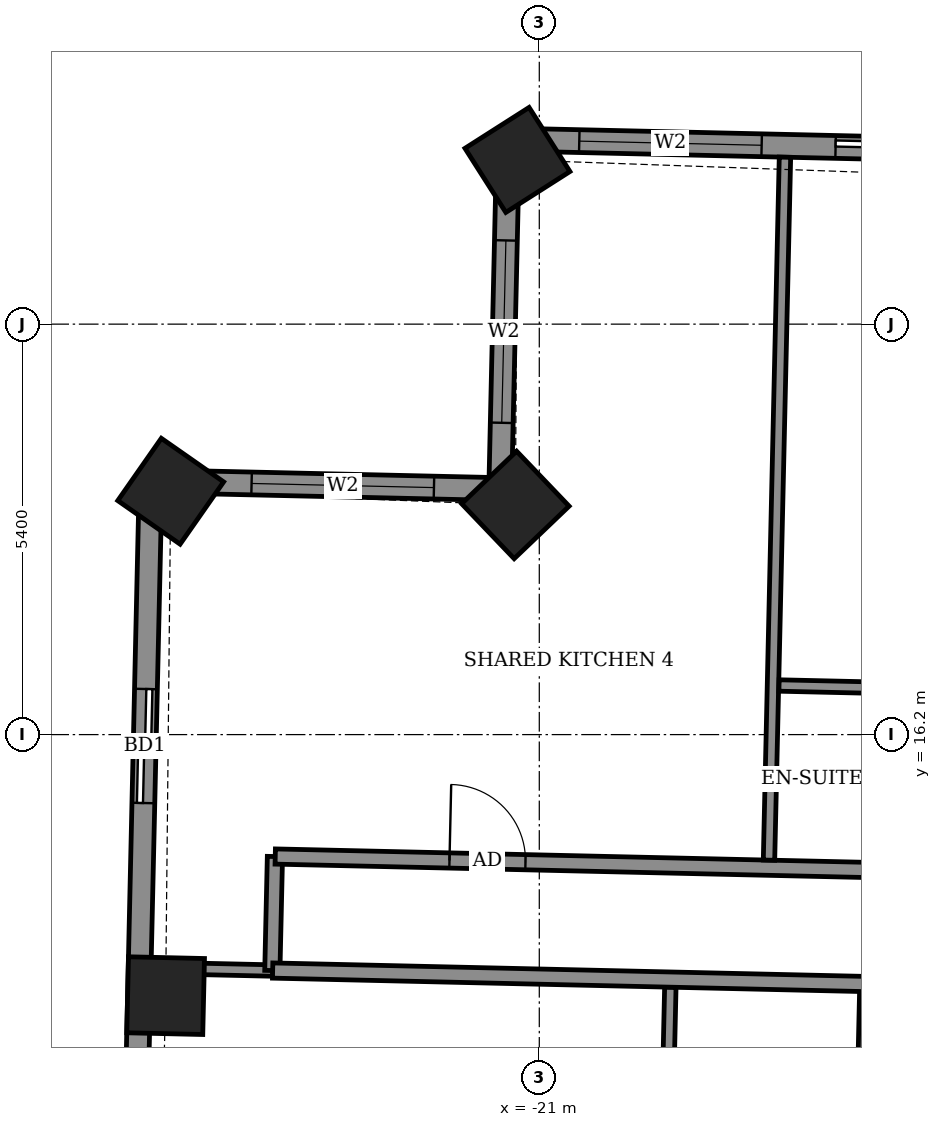
"""IFC4 building model, lengths in metres.
Left out: names, types, materials, properties, quantities, classifications, styles, units other than length and angle.
Written with IfcOpenShell. Run it as: python <this file> out.ifc"""

import sys

from ifc_helpers import new_model, si_unit, direction, frame, frame_2d, origin, origin_2d, place, context, subcontext, project, spatial, rectangle, extrude, element, fill, save


model = new_model("IFC4")
c1 = context("Model", 3, precision=1e-05, world=origin(), true_north=direction((0.0, 1.0)))
c2 = subcontext(c1, "Body", "Model", "MODEL_VIEW")
j1 = project(units=[si_unit("LENGTHUNIT", "METRE"), si_unit("PLANEANGLEUNIT", "RADIAN")], contexts=[c1])
p1 = place(None, origin())
s1 = spatial("IfcSite", under=j1, at=p1, CompositionType="ELEMENT")
p2 = place(p1, origin())
s2 = spatial("IfcBuilding", under=s1, at=p2, CompositionType="ELEMENT")
p3 = place(p2, frame((0.0, 0.0, 268.1)))
s3 = spatial("IfcBuildingStorey", under=s2, at=p3, CompositionType="ELEMENT", Elevation=268.1)
for number, where, z_axis, x_axis in (
    (1, (-21.287, 23.76, -0.55), (0.0, 0.0, 1.0), (-0.843, -0.538, 0.0)),
    (2, (-21.314, 19.221, -0.55), (0.0, 0.0, 1.0), (-0.723, -0.691, 0.0)),
    (3, (-25.849, 19.402, -0.55), (0.0, 0.0, 1.0), (-0.573, -0.82, 0.0)),
    (4, (-25.916, 12.766, -0.55), (0.0, 0.0, 1.0), (-0.023, -1.0, 0.0)),
):
    element("IfcColumn", number, at=place(p3, frame(where, z_axis=z_axis, x_axis=x_axis)), inside=s3, PredefinedType="COLUMN", context=c2, shape_type="SweptSolid", body=[
        extrude(rectangle(XDim=1.0, YDim=1.0, at=origin_2d()), origin(), (0.0, 0.0, 1.0), 3.6),
    ])
p4 = place(p3, frame((26.35, 22.945, 0.0), z_axis=(0.0, 0.0, 1.0), x_axis=(-0.999742523712, 0.022691105788, 0.0)))
e5 = element("IfcWall", 5, at=p4, inside=s3, PredefinedType="SOLIDWALL", context=c2, shape_type="SweptSolid", body=[
    extrude(rectangle(XDim=47.771, YDim=0.3, at=frame_2d((23.886, 0.0))), origin(), (0.0, 0.0, 1.0), 2.55),
])
p5 = place(p4, frame((1.954, 0.0, 0.0)))
e6 = element("IfcOpeningElement", 6, at=p5, cuts=e5, PredefinedType="OPENING", context=c2, shape_type="SweptSolid", body=[
    extrude(rectangle(XDim=1.5, YDim=2.4, at=frame_2d((0.75, 1.2))), frame((0.0, 0.16, 0.0), z_axis=(0.0, -1.0, 0.0), x_axis=(1.0, 0.0, 0.0)), (0.0, 0.0, 1.0), 0.32),
])
p6 = place(p4, frame((7.37, 0.0, 0.0)))
e7 = element("IfcOpeningElement", 7, at=p6, cuts=e5, PredefinedType="OPENING", context=c2, shape_type="SweptSolid", body=[
    extrude(rectangle(XDim=1.5, YDim=2.4, at=frame_2d((0.75, 1.2))), frame((0.0, 0.16, 0.0), z_axis=(0.0, -1.0, 0.0), x_axis=(1.0, 0.0, 0.0)), (0.0, 0.0, 1.0), 0.32),
])
p7 = place(p4, frame((10.554, 0.0, 0.0)))
e8 = element("IfcOpeningElement", 8, at=p7, cuts=e5, PredefinedType="OPENING", context=c2, shape_type="SweptSolid", body=[
    extrude(rectangle(XDim=1.5, YDim=2.4, at=frame_2d((0.75, 1.2))), frame((0.0, 0.16, 0.0), z_axis=(0.0, -1.0, 0.0), x_axis=(1.0, 0.0, 0.0)), (0.0, 0.0, 1.0), 0.32),
])
p8 = place(p4, frame((15.104, 0.0, 0.0)))
e9 = element("IfcOpeningElement", 9, at=p8, cuts=e5, PredefinedType="OPENING", context=c2, shape_type="SweptSolid", body=[
    extrude(rectangle(XDim=1.5, YDim=2.4, at=frame_2d((0.75, 1.2))), frame((0.0, 0.16, 0.0), z_axis=(0.0, -1.0, 0.0), x_axis=(1.0, 0.0, 0.0)), (0.0, 0.0, 1.0), 0.32),
])
p9 = place(p4, frame((18.287, 0.0, 0.0)))
e10 = element("IfcOpeningElement", 10, at=p9, cuts=e5, PredefinedType="OPENING", context=c2, shape_type="SweptSolid", body=[
    extrude(rectangle(XDim=1.5, YDim=2.4, at=frame_2d((0.75, 1.2))), frame((0.0, 0.16, 0.0), z_axis=(0.0, -1.0, 0.0), x_axis=(1.0, 0.0, 0.0)), (0.0, 0.0, 1.0), 0.32),
])
p10 = place(p4, frame((23.622, 0.0, 0.0)))
e11 = element("IfcOpeningElement", 11, at=p10, cuts=e5, PredefinedType="OPENING", context=c2, shape_type="SweptSolid", body=[
    extrude(rectangle(XDim=1.5, YDim=2.4, at=frame_2d((0.75, 1.2))), frame((0.0, 0.16, 0.0), z_axis=(0.0, -1.0, 0.0), x_axis=(1.0, 0.0, 0.0)), (0.0, 0.0, 1.0), 0.32),
])
p11 = place(p4, frame((28.521, 0.0, 0.0)))
e12 = element("IfcOpeningElement", 12, at=p11, cuts=e5, PredefinedType="OPENING", context=c2, shape_type="SweptSolid", body=[
    extrude(rectangle(XDim=1.5, YDim=2.4, at=frame_2d((0.75, 1.2))), frame((0.0, 0.16, 0.0), z_axis=(0.0, -1.0, 0.0), x_axis=(1.0, 0.0, 0.0)), (0.0, 0.0, 1.0), 0.32),
])
p12 = place(p4, frame((31.705, 0.0, 0.0)))
e13 = element("IfcOpeningElement", 13, at=p12, cuts=e5, PredefinedType="OPENING", context=c2, shape_type="SweptSolid", body=[
    extrude(rectangle(XDim=1.5, YDim=2.4, at=frame_2d((0.75, 1.2))), frame((0.0, 0.16, 0.0), z_axis=(0.0, -1.0, 0.0), x_axis=(1.0, 0.0, 0.0)), (0.0, 0.0, 1.0), 0.32),
])
p13 = place(p4, frame((36.722, 0.0, 0.0)))
e14 = element("IfcOpeningElement", 14, at=p13, cuts=e5, PredefinedType="OPENING", context=c2, shape_type="SweptSolid", body=[
    extrude(rectangle(XDim=1.5, YDim=2.4, at=frame_2d((0.75, 1.2))), frame((0.0, 0.16, 0.0), z_axis=(0.0, -1.0, 0.0), x_axis=(1.0, 0.0, 0.0)), (0.0, 0.0, 1.0), 0.32),
])
p14 = place(p4, frame((41.963, 0.0, 0.0)))
e15 = element("IfcOpeningElement", 15, at=p14, cuts=e5, PredefinedType="OPENING", context=c2, shape_type="SweptSolid", body=[
    extrude(rectangle(XDim=1.5, YDim=2.4, at=frame_2d((0.75, 1.2))), frame((0.0, 0.16, 0.0), z_axis=(0.0, -1.0, 0.0), x_axis=(1.0, 0.0, 0.0)), (0.0, 0.0, 1.0), 0.32),
])
p15 = place(p4, frame((44.436, 0.0, 0.9)))
e16 = element("IfcOpeningElement", 16, at=p15, cuts=e5, PredefinedType="OPENING", context=c2, shape_type="SweptSolid", body=[
    extrude(rectangle(XDim=2.4, YDim=1.5, at=frame_2d((1.2, 0.75))), frame((0.0, 0.16, 0.0), z_axis=(0.0, -1.0, 0.0), x_axis=(1.0, 0.0, 0.0)), (0.0, 0.0, 1.0), 0.32),
])
p16 = place(p3, frame((-21.409, 24.029, 0.0), z_axis=(0.0, 0.0, 1.0), x_axis=(-0.022820258049, -0.999739584003, 0.0)))
e17 = element("IfcWall", 17, at=p16, inside=s3, PredefinedType="SOLIDWALL", context=c2, shape_type="SweptSolid", body=[
    extrude(rectangle(XDim=4.6, YDim=0.3, at=frame_2d((2.3, 0.0))), origin(), (0.0, 0.0, 1.0), 2.55),
])
p17 = place(p16, frame((1.328, 0.0, 0.9)))
e18 = element("IfcOpeningElement", 18, at=p17, cuts=e17, PredefinedType="OPENING", context=c2, shape_type="SweptSolid", body=[
    extrude(rectangle(XDim=2.4, YDim=1.5, at=frame_2d((1.2, 0.75))), frame((0.0, 0.16, 0.0), z_axis=(0.0, -1.0, 0.0), x_axis=(1.0, 0.0, 0.0)), (0.0, 0.0, 1.0), 0.32),
])
p18 = place(p3, frame((-21.514, 19.43, 0.0), z_axis=(0.0, 0.0, 1.0), x_axis=(-0.999744404568, 0.02260808559, 0.0)))
e19 = element("IfcWall", 19, at=p18, inside=s3, PredefinedType="SOLIDWALL", context=c2, shape_type="SweptSolid", body=[
    extrude(rectangle(XDim=4.6, YDim=0.3, at=frame_2d((2.3, 0.0))), origin(), (0.0, 0.0, 1.0), 2.55),
])
p19 = place(p18, frame((0.872, 0.0, 0.9)))
e20 = element("IfcOpeningElement", 20, at=p19, cuts=e19, PredefinedType="OPENING", context=c2, shape_type="SweptSolid", body=[
    extrude(rectangle(XDim=2.4, YDim=1.5, at=frame_2d((1.2, 0.75))), frame((0.0, 0.16, 0.0), z_axis=(0.0, -1.0, 0.0), x_axis=(1.0, 0.0, 0.0)), (0.0, 0.0, 1.0), 0.32),
])
p20 = place(p3, frame((-26.113, 19.534, 0.0), z_axis=(0.0, 0.0, 1.0), x_axis=(-0.022649415303, -0.999743469089, 0.0)))
e21 = element("IfcWall", 21, at=p20, inside=s3, PredefinedType="SOLIDWALL", context=c2, shape_type="SweptSolid", body=[
    extrude(rectangle(XDim=14.175, YDim=0.3, at=frame_2d((7.087, 0.0))), origin(), (0.0, 0.0, 1.0), 2.55),
])
p21 = place(p20, frame((2.735, 0.0, 0.0)))
e22 = element("IfcOpeningElement", 22, at=p21, cuts=e21, PredefinedType="OPENING", context=c2, shape_type="SweptSolid", body=[
    extrude(rectangle(XDim=1.5, YDim=2.4, at=frame_2d((0.75, 1.2))), frame((0.0, 0.16, 0.0), z_axis=(0.0, -1.0, 0.0), x_axis=(1.0, 0.0, 0.0)), (0.0, 0.0, 1.0), 0.32),
])
p22 = place(p20, frame((9.019, 0.0, 0.9)))
e23 = element("IfcOpeningElement", 23, at=p22, cuts=e21, PredefinedType="OPENING", context=c2, shape_type="SweptSolid", body=[
    extrude(rectangle(XDim=2.4, YDim=1.5, at=frame_2d((1.2, 0.75))), frame((0.0, 0.16, 0.0), z_axis=(0.0, -1.0, 0.0), x_axis=(1.0, 0.0, 0.0)), (0.0, 0.0, 1.0), 0.32),
])
p23 = place(p3, frame((-17.262, -12.525, 0.0), z_axis=(0.0, 0.0, 1.0), x_axis=(0.022706151961, 0.999742182097, 0.0)))
e24 = element("IfcWall", 24, at=p23, inside=s3, PredefinedType="PARTITIONING", context=c2, shape_type="SweptSolid", body=[
    extrude(rectangle(XDim=25.45, YDim=0.2, at=frame_2d((12.725, 0.0))), origin(), (0.0, 0.0, 1.0), 3.05),
])
p24 = place(p23, frame((19.913, 0.0, 0.0)))
e25 = element("IfcOpeningElement", 25, at=p24, cuts=e24, PredefinedType="OPENING", context=c2, shape_type="SweptSolid", body=[
    extrude(rectangle(XDim=1.0, YDim=2.1, at=frame_2d((0.5, 1.05))), frame((0.0, 0.11, 0.0), z_axis=(0.0, -1.0, 0.0), x_axis=(1.0, 0.0, 0.0)), (0.0, 0.0, 1.0), 0.22),
])
p25 = place(p23, frame((23.6, 0.0, 0.0)))
e26 = element("IfcOpeningElement", 26, at=p25, cuts=e24, PredefinedType="OPENING", context=c2, shape_type="SweptSolid", body=[
    extrude(rectangle(XDim=0.9, YDim=2.1, at=frame_2d((0.45, 1.05))), frame((0.0, 0.11, 0.0), z_axis=(0.0, -1.0, 0.0), x_axis=(1.0, 0.0, 0.0)), (0.0, 0.0, 1.0), 0.22),
])
p26 = place(p23, frame((14.325, 0.0, 0.0)))
e27 = element("IfcOpeningElement", 27, at=p26, cuts=e24, PredefinedType="OPENING", context=c2, shape_type="SweptSolid", body=[
    extrude(rectangle(XDim=1.0, YDim=2.1, at=frame_2d((0.5, 1.05))), frame((0.0, 0.11, 0.0), z_axis=(0.0, -1.0, 0.0), x_axis=(1.0, 0.0, 0.0)), (0.0, 0.0, 1.0), 0.22),
])
p27 = place(p23, frame((16.525, 0.0, 0.0)))
e28 = element("IfcOpeningElement", 28, at=p27, cuts=e24, PredefinedType="OPENING", context=c2, shape_type="SweptSolid", body=[
    extrude(rectangle(XDim=0.9, YDim=2.1, at=frame_2d((0.45, 1.05))), frame((0.0, 0.11, 0.0), z_axis=(0.0, -1.0, 0.0), x_axis=(1.0, 0.0, 0.0)), (0.0, 0.0, 1.0), 0.22),
])
p28 = place(p23, frame((9.85, 0.0, 0.0)))
e29 = element("IfcOpeningElement", 29, at=p28, cuts=e24, PredefinedType="OPENING", context=c2, shape_type="SweptSolid", body=[
    extrude(rectangle(XDim=1.0, YDim=2.1, at=frame_2d((0.5, 1.05))), frame((0.0, 0.11, 0.0), z_axis=(0.0, -1.0, 0.0), x_axis=(1.0, 0.0, 0.0)), (0.0, 0.0, 1.0), 0.22),
])
p29 = place(p23, frame((12.125, 0.0, 0.0)))
e30 = element("IfcOpeningElement", 30, at=p29, cuts=e24, PredefinedType="OPENING", context=c2, shape_type="SweptSolid", body=[
    extrude(rectangle(XDim=0.9, YDim=2.1, at=frame_2d((0.45, 1.05))), frame((0.0, 0.11, 0.0), z_axis=(0.0, -1.0, 0.0), x_axis=(1.0, 0.0, 0.0)), (0.0, 0.0, 1.0), 0.22),
])
p30 = place(p23, frame((7.725, 0.0, 0.0)))
e31 = element("IfcOpeningElement", 31, at=p30, cuts=e24, PredefinedType="OPENING", context=c2, shape_type="SweptSolid", body=[
    extrude(rectangle(XDim=1.0, YDim=2.1, at=frame_2d((0.5, 1.05))), frame((0.0, 0.11, 0.0), z_axis=(0.0, -1.0, 0.0), x_axis=(1.0, 0.0, 0.0)), (0.0, 0.0, 1.0), 0.22),
])
p31 = place(p23, frame((5.275, 0.0, 0.0)))
e32 = element("IfcOpeningElement", 32, at=p31, cuts=e24, PredefinedType="OPENING", context=c2, shape_type="SweptSolid", body=[
    extrude(rectangle(XDim=0.9, YDim=2.1, at=frame_2d((0.45, 1.05))), frame((0.0, 0.11, 0.0), z_axis=(0.0, -1.0, 0.0), x_axis=(1.0, 0.0, 0.0)), (0.0, 0.0, 1.0), 0.22),
])
p32 = place(p23, frame((0.512, 0.0, 0.0)))
e33 = element("IfcOpeningElement", 33, at=p32, cuts=e24, PredefinedType="OPENING", context=c2, shape_type="SweptSolid", body=[
    extrude(rectangle(XDim=1.0, YDim=2.1, at=frame_2d((0.5, 1.05))), frame((0.0, 0.11, 0.0), z_axis=(0.0, -1.0, 0.0), x_axis=(1.0, 0.0, 0.0)), (0.0, 0.0, 1.0), 0.22),
])
p33 = place(p23, frame((2.775, 0.0, 0.0)))
e34 = element("IfcOpeningElement", 34, at=p33, cuts=e24, PredefinedType="OPENING", context=c2, shape_type="SweptSolid", body=[
    extrude(rectangle(XDim=0.9, YDim=2.1, at=frame_2d((0.45, 1.05))), frame((0.0, 0.11, 0.0), z_axis=(0.0, -1.0, 0.0), x_axis=(1.0, 0.0, 0.0)), (0.0, 0.0, 1.0), 0.22),
])
p34 = place(p3, frame((-19.337, 10.178, 0.0), z_axis=(0.0, 0.0, 1.0), x_axis=(0.02260842146, 0.999744396973, 0.0)))
e35 = element("IfcWall", 35, at=p34, inside=s3, PredefinedType="PARTITIONING", context=c2, shape_type="SweptSolid", body=[
    extrude(rectangle(XDim=2.7, YDim=0.15, at=frame_2d((1.35, 0.0))), origin(), (0.0, 0.0, 1.0), 3.05),
])
p35 = place(p3, frame((-26.108, 13.132, 0.0), z_axis=(0.0, 0.0, 1.0), x_axis=(0.999746371854, -0.022520922836, 0.0)))
e36 = element("IfcWall", 36, at=p35, inside=s3, PredefinedType="PARTITIONING", context=c2, shape_type="SweptSolid", body=[
    extrude(rectangle(XDim=1.604, YDim=0.15, at=frame_2d((0.802, 0.0))), origin(), (0.0, 0.0, 1.0), 3.05),
])
p36 = place(p3, frame((-24.512, 13.096, 0.0), z_axis=(0.0, 0.0, 1.0), x_axis=(0.022617910375, 0.999744182344, 0.0)))
e37 = element("IfcWall", 37, at=p36, inside=s3, PredefinedType="PARTITIONING", context=c2, shape_type="SweptSolid", body=[
    extrude(rectangle(XDim=1.5, YDim=0.2, at=frame_2d((0.75, 0.0))), origin(), (0.0, 0.0, 1.0), 3.05),
])
p37 = place(p3, frame((-24.508, 13.096, 0.0), z_axis=(0.0, 0.0, 1.0), x_axis=(0.99974170677, -0.022727070732, 0.0)))
e38 = element("IfcWall", 38, at=p37, inside=s3, PredefinedType="PARTITIONING", context=c2, shape_type="SweptSolid", body=[
    extrude(rectangle(XDim=7.831, YDim=0.2, at=frame_2d((3.916, 0.0))), origin(), (0.0, 0.0, 1.0), 3.05),
])
p38 = place(p3, frame((-24.474, 14.596, 0.0), z_axis=(0.0, 0.0, 1.0), x_axis=(0.999742424031, -0.022695497208, 0.0)))
e39 = element("IfcWall", 39, at=p38, inside=s3, PredefinedType="PARTITIONING", context=c2, shape_type="SweptSolid", body=[
    extrude(rectangle(XDim=52.872, YDim=0.2, at=frame_2d((26.436, 0.0))), origin(), (0.0, 0.0, 1.0), 3.05),
])
p39 = place(p38, frame((51.161, 0.0, 0.0)))
e40 = element("IfcOpeningElement", 40, at=p39, cuts=e39, PredefinedType="OPENING", context=c2, shape_type="SweptSolid", body=[
    extrude(rectangle(XDim=1.0, YDim=2.1, at=frame_2d((0.5, 1.05))), frame((0.0, 0.11, 0.0), z_axis=(0.0, -1.0, 0.0), x_axis=(1.0, 0.0, 0.0)), (0.0, 0.0, 1.0), 0.22),
])
p40 = place(p38, frame((46.7, 0.0, 0.0)))
e41 = element("IfcOpeningElement", 41, at=p40, cuts=e39, PredefinedType="OPENING", context=c2, shape_type="SweptSolid", body=[
    extrude(rectangle(XDim=0.9, YDim=2.1, at=frame_2d((0.45, 1.05))), frame((0.0, 0.11, 0.0), z_axis=(0.0, -1.0, 0.0), x_axis=(1.0, 0.0, 0.0)), (0.0, 0.0, 1.0), 0.22),
])
p41 = place(p38, frame((44.3, 0.0, 0.0)))
e42 = element("IfcOpeningElement", 42, at=p41, cuts=e39, PredefinedType="OPENING", context=c2, shape_type="SweptSolid", body=[
    extrude(rectangle(XDim=0.9, YDim=2.1, at=frame_2d((0.45, 1.05))), frame((0.0, 0.11, 0.0), z_axis=(0.0, -1.0, 0.0), x_axis=(1.0, 0.0, 0.0)), (0.0, 0.0, 1.0), 0.22),
])
p42 = place(p38, frame((37.575, 0.0, 0.0)))
e43 = element("IfcOpeningElement", 43, at=p42, cuts=e39, PredefinedType="OPENING", context=c2, shape_type="SweptSolid", body=[
    extrude(rectangle(XDim=0.9, YDim=2.1, at=frame_2d((0.45, 1.05))), frame((0.0, 0.11, 0.0), z_axis=(0.0, -1.0, 0.0), x_axis=(1.0, 0.0, 0.0)), (0.0, 0.0, 1.0), 0.22),
])
p43 = place(p38, frame((35.675, 0.0, 0.0)))
e44 = element("IfcOpeningElement", 44, at=p43, cuts=e39, PredefinedType="OPENING", context=c2, shape_type="SweptSolid", body=[
    extrude(rectangle(XDim=0.9, YDim=2.1, at=frame_2d((0.45, 1.05))), frame((0.0, 0.11, 0.0), z_axis=(0.0, -1.0, 0.0), x_axis=(1.0, 0.0, 0.0)), (0.0, 0.0, 1.0), 0.22),
])
p44 = place(p38, frame((28.95, 0.0, 0.0)))
e45 = element("IfcOpeningElement", 45, at=p44, cuts=e39, PredefinedType="OPENING", context=c2, shape_type="SweptSolid", body=[
    extrude(rectangle(XDim=0.9, YDim=2.1, at=frame_2d((0.45, 1.05))), frame((0.0, 0.11, 0.0), z_axis=(0.0, -1.0, 0.0), x_axis=(1.0, 0.0, 0.0)), (0.0, 0.0, 1.0), 0.22),
])
p45 = place(p38, frame((27.0, 0.0, 0.0)))
e46 = element("IfcOpeningElement", 46, at=p45, cuts=e39, PredefinedType="OPENING", context=c2, shape_type="SweptSolid", body=[
    extrude(rectangle(XDim=0.9, YDim=2.1, at=frame_2d((0.45, 1.05))), frame((0.0, 0.11, 0.0), z_axis=(0.0, -1.0, 0.0), x_axis=(1.0, 0.0, 0.0)), (0.0, 0.0, 1.0), 0.22),
])
p46 = place(p38, frame((20.2, 0.0, 0.0)))
e47 = element("IfcOpeningElement", 47, at=p46, cuts=e39, PredefinedType="OPENING", context=c2, shape_type="SweptSolid", body=[
    extrude(rectangle(XDim=0.9, YDim=2.1, at=frame_2d((0.45, 1.05))), frame((0.0, 0.11, 0.0), z_axis=(0.0, -1.0, 0.0), x_axis=(1.0, 0.0, 0.0)), (0.0, 0.0, 1.0), 0.22),
])
p47 = place(p38, frame((18.25, 0.0, 0.0)))
e48 = element("IfcOpeningElement", 48, at=p47, cuts=e39, PredefinedType="OPENING", context=c2, shape_type="SweptSolid", body=[
    extrude(rectangle(XDim=0.9, YDim=2.1, at=frame_2d((0.45, 1.05))), frame((0.0, 0.11, 0.0), z_axis=(0.0, -1.0, 0.0), x_axis=(1.0, 0.0, 0.0)), (0.0, 0.0, 1.0), 0.22),
])
p48 = place(p38, frame((11.5, 0.0, 0.0)))
e49 = element("IfcOpeningElement", 49, at=p48, cuts=e39, PredefinedType="OPENING", context=c2, shape_type="SweptSolid", body=[
    extrude(rectangle(XDim=0.9, YDim=2.1, at=frame_2d((0.45, 1.05))), frame((0.0, 0.11, 0.0), z_axis=(0.0, -1.0, 0.0), x_axis=(1.0, 0.0, 0.0)), (0.0, 0.0, 1.0), 0.22),
])
p49 = place(p38, frame((9.475, 0.0, 0.0)))
e50 = element("IfcOpeningElement", 50, at=p49, cuts=e39, PredefinedType="OPENING", context=c2, shape_type="SweptSolid", body=[
    extrude(rectangle(XDim=0.9, YDim=2.1, at=frame_2d((0.45, 1.05))), frame((0.0, 0.11, 0.0), z_axis=(0.0, -1.0, 0.0), x_axis=(1.0, 0.0, 0.0)), (0.0, 0.0, 1.0), 0.22),
])
p50 = place(p38, frame((2.293, 0.0, 0.0)))
e51 = element("IfcOpeningElement", 51, at=p50, cuts=e39, PredefinedType="OPENING", context=c2, shape_type="SweptSolid", body=[
    extrude(rectangle(XDim=1.0, YDim=2.1, at=frame_2d((0.5, 1.05))), frame((0.0, 0.11, 0.0), z_axis=(0.0, -1.0, 0.0), x_axis=(1.0, 0.0, 0.0)), (0.0, 0.0, 1.0), 0.22),
])
p51 = place(p3, frame((-17.978, 14.548, 0.0), z_axis=(0.0, 0.0, 1.0), x_axis=(0.022698023584, 0.999742366675, 0.0)))
e52 = element("IfcWall", 52, at=p51, inside=s3, PredefinedType="PARTITIONING", context=c2, shape_type="SweptSolid", body=[
    extrude(rectangle(XDim=9.25, YDim=0.15, at=frame_2d((4.625, 0.0))), origin(), (0.0, 0.0, 1.0), 2.55),
])
p52 = place(p3, frame((-17.846, 16.846, 0.0), z_axis=(0.0, 0.0, 1.0), x_axis=(0.999740260747, -0.02279059109, 0.0)))
e53 = element("IfcWall", 53, at=p52, inside=s3, PredefinedType="PARTITIONING", context=c2, shape_type="SweptSolid", body=[
    extrude(rectangle(XDim=2.324, YDim=0.15, at=frame_2d((1.162, 0.0))), origin(), (0.0, 0.0, 1.0), 3.05),
])
p53 = place(p14, origin())
e54 = element("IfcDoor", 54, at=p53, inside=s3, OperationType="SLIDING_TO_LEFT", PredefinedType="DOOR", context=c2, shape_type="SweptSolid", body=[
    extrude(rectangle(XDim=1.5, YDim=2.4, at=frame_2d((0.75, 1.2))), frame((0.0, 0.025, 0.0), z_axis=(0.0, -1.0, 0.0), x_axis=(1.0, 0.0, 0.0)), (0.0, 0.0, 1.0), 0.05),
])
fill(e15, e54)
p54 = place(p15, origin())
e55 = element("IfcWindow", 55, at=p54, inside=s3, PartitioningType="DOUBLE_PANEL_VERTICAL", PredefinedType="WINDOW", context=c2, shape_type="SweptSolid", body=[
    extrude(rectangle(XDim=2.4, YDim=1.5, at=frame_2d((1.2, 0.75))), frame((0.0, 0.03, 0.0), z_axis=(0.0, -1.0, 0.0), x_axis=(1.0, 0.0, 0.0)), (0.0, 0.0, 1.0), 0.06),
])
fill(e16, e55)
p55 = place(p17, origin())
e56 = element("IfcWindow", 56, at=p55, inside=s3, PartitioningType="DOUBLE_PANEL_VERTICAL", PredefinedType="WINDOW", context=c2, shape_type="SweptSolid", body=[
    extrude(rectangle(XDim=2.4, YDim=1.5, at=frame_2d((1.2, 0.75))), frame((0.0, 0.03, 0.0), z_axis=(0.0, -1.0, 0.0), x_axis=(1.0, 0.0, 0.0)), (0.0, 0.0, 1.0), 0.06),
])
fill(e18, e56)
p56 = place(p19, origin())
e57 = element("IfcWindow", 57, at=p56, inside=s3, PartitioningType="DOUBLE_PANEL_VERTICAL", PredefinedType="WINDOW", context=c2, shape_type="SweptSolid", body=[
    extrude(rectangle(XDim=2.4, YDim=1.5, at=frame_2d((1.2, 0.75))), frame((0.0, 0.03, 0.0), z_axis=(0.0, -1.0, 0.0), x_axis=(1.0, 0.0, 0.0)), (0.0, 0.0, 1.0), 0.06),
])
fill(e20, e57)
p57 = place(p21, origin())
e58 = element("IfcDoor", 58, at=p57, inside=s3, OperationType="SLIDING_TO_LEFT", PredefinedType="DOOR", context=c2, shape_type="SweptSolid", body=[
    extrude(rectangle(XDim=1.5, YDim=2.4, at=frame_2d((0.75, 1.2))), frame((0.0, 0.025, 0.0), z_axis=(0.0, -1.0, 0.0), x_axis=(1.0, 0.0, 0.0)), (0.0, 0.0, 1.0), 0.05),
])
fill(e22, e58)
p58 = place(p50, origin())
e59 = element("IfcDoor", 59, at=p58, inside=s3, OperationType="SINGLE_SWING_RIGHT", PredefinedType="DOOR", context=c2, shape_type="SweptSolid", body=[
    extrude(rectangle(XDim=1.0, YDim=2.1, at=frame_2d((0.5, 1.05))), frame((0.0, 0.025, 0.0), z_axis=(0.0, -1.0, 0.0), x_axis=(1.0, 0.0, 0.0)), (0.0, 0.0, 1.0), 0.05),
])
fill(e51, e59)
save(model, sys.argv[1])
